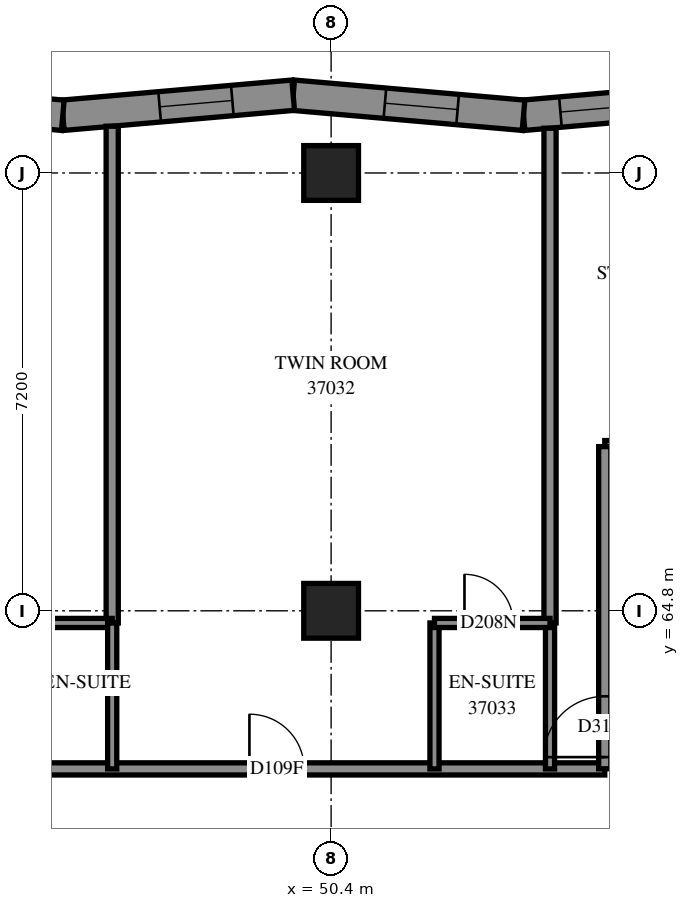
"""IFC4 building model, lengths in metres.
Left out: names, types, materials, properties, quantities, classifications, styles, units other than length and angle.
Written with IfcOpenShell. Run it as: python <this file> out.ifc"""

import sys

from ifc_helpers import new_model, si_unit, direction, frame, frame_2d, origin, origin_2d, place, context, subcontext, project, spatial, polyline, rectangle, outline, extrude, element, fill, save


model = new_model("IFC4")
c1 = context("Model", 3, precision=1e-05, world=origin(), true_north=direction((0.0, 1.0)))
c2 = subcontext(c1, "Body", "Model", "MODEL_VIEW")
j1 = project(units=[si_unit("LENGTHUNIT", "METRE"), si_unit("PLANEANGLEUNIT", "RADIAN")], contexts=[c1])
p1 = place(None, origin())
s1 = spatial("IfcSite", under=j1, at=p1, CompositionType="ELEMENT")
p2 = place(p1, origin())
s2 = spatial("IfcBuilding", under=s1, at=p2, CompositionType="ELEMENT")
p3 = place(p2, frame((0.0, 0.0, 138.8)))
s3 = spatial("IfcBuildingStorey", under=s2, at=p3, CompositionType="ELEMENT", Elevation=138.8)
for number, where, z_axis, x_axis in (
    (1, (50.4, 64.8, 0.0), (0.0, 0.0, 1.0), (1.0, 0.0, 0.0)),
    (2, (50.4, 72.0, 0.0), (0.0, 0.0, 1.0), (1.0, 0.0, 0.0)),
):
    element("IfcColumn", number, at=place(p3, frame(where, z_axis=z_axis, x_axis=x_axis)), inside=s3, PredefinedType="COLUMN", context=c2, shape_type="SweptSolid", body=[
        extrude(rectangle(XDim=0.9, YDim=0.9, at=origin_2d()), origin(), (0.0, 0.0, 1.0), 3.1),
    ])
p4 = place(p3, frame((57.353, 73.279, 0.0), z_axis=(0.0, 0.0, 1.0), x_axis=(-0.9962273538, -0.0867816769, 0.0)))
e3 = element("IfcWall", 3, at=p4, inside=s3, PredefinedType="SOLIDWALL", context=c2, shape_type="SweptSolid", body=[
    extrude(outline(polyline([(-0.022, -0.25), (3.781, -0.25), (3.824, 0.25), (0.022, 0.25), (-0.022, -0.25)])), origin(), (0.0, 0.0, 1.0), 3.1),
])
p5 = place(p4, frame((0.394, 0.0, 0.45)))
e4 = element("IfcOpeningElement", 4, at=p5, cuts=e3, PredefinedType="OPENING", context=c2, shape_type="SweptSolid", body=[
    extrude(rectangle(XDim=2.8, YDim=2.5, at=frame_2d((1.4, 1.25))), frame((0.0, 0.26, 0.0), z_axis=(0.0, -1.0, 0.0), x_axis=(1.0, 0.0, 0.0)), (0.0, 0.0, 1.0), 0.52),
])
p6 = place(p3, frame((53.564, 72.949, 0.0), z_axis=(0.0, 0.0, 1.0), x_axis=(-0.9962271558, 0.0867839505, 0.0)))
e5 = element("IfcWall", 5, at=p6, inside=s3, PredefinedType="SOLIDWALL", context=c2, shape_type="SweptSolid", body=[
    extrude(outline(polyline([(0.022, -0.25), (3.824, -0.25), (3.781, 0.25), (-0.022, 0.25), (0.022, -0.25)])), origin(), (0.0, 0.0, 1.0), 3.1),
])
p7 = place(p6, frame((1.088, 0.0, 0.45)))
e6 = element("IfcOpeningElement", 6, at=p7, cuts=e5, PredefinedType="OPENING", context=c2, shape_type="SweptSolid", body=[
    extrude(rectangle(XDim=1.2, YDim=2.5, at=frame_2d((0.6, 1.25))), frame((0.0, 0.26, 0.0), z_axis=(0.0, -1.0, 0.0), x_axis=(1.0, 0.0, 0.0)), (0.0, 0.0, 1.0), 0.52),
])
p8 = place(p3, frame((49.776, 73.279, 0.0), z_axis=(0.0, 0.0, 1.0), x_axis=(-0.9962273538, -0.0867816769, 0.0)))
e7 = element("IfcWall", 7, at=p8, inside=s3, PredefinedType="SOLIDWALL", context=c2, shape_type="SweptSolid", body=[
    extrude(outline(polyline([(-0.022, -0.25), (3.781, -0.25), (3.824, 0.25), (0.022, 0.25), (-0.022, -0.25)])), origin(), (0.0, 0.0, 1.0), 3.1),
])
p9 = place(p8, frame((1.005, 0.0, 0.45)))
e8 = element("IfcOpeningElement", 8, at=p9, cuts=e7, PredefinedType="OPENING", context=c2, shape_type="SweptSolid", body=[
    extrude(rectangle(XDim=1.2, YDim=2.5, at=frame_2d((0.6, 1.25))), frame((0.0, 0.26, 0.0), z_axis=(0.0, -1.0, 0.0), x_axis=(1.0, 0.0, 0.0)), (0.0, 0.0, 1.0), 0.52),
])
p10 = place(p3, frame((45.988, 72.949, 0.0), z_axis=(0.0, 0.0, 1.0), x_axis=(-0.9962273538, 0.0867816769, 0.0)))
e9 = element("IfcWall", 9, at=p10, inside=s3, PredefinedType="SOLIDWALL", context=c2, shape_type="SweptSolid", body=[
    extrude(outline(polyline([(0.022, -0.25), (3.824, -0.25), (3.781, 0.25), (-0.022, 0.25), (0.022, -0.25)])), origin(), (0.0, 0.0, 1.0), 3.1),
])
p11 = place(p10, frame((0.899, 0.0, 0.45)))
e10 = element("IfcOpeningElement", 10, at=p11, cuts=e9, PredefinedType="OPENING", context=c2, shape_type="SweptSolid", body=[
    extrude(rectangle(XDim=1.2, YDim=2.5, at=frame_2d((0.6, 1.25))), frame((0.0, 0.26, 0.0), z_axis=(0.0, -1.0, 0.0), x_axis=(1.0, 0.0, 0.0)), (0.0, 0.0, 1.0), 0.52),
])
p12 = place(p3, frame((54.9, 67.5, 0.0), z_axis=(0.0, 0.0, 1.0), x_axis=(1.0, 0.0, 0.0)))
e11 = element("IfcWall", 11, at=p12, inside=s3, PredefinedType="PARTITIONING", context=c2, shape_type="SweptSolid", body=[
    extrude(rectangle(XDim=19.8, YDim=0.2, at=frame_2d((9.9, 0.0))), origin(), (0.0, 0.0, 1.0), 3.1),
])
p13 = place(p12, frame((6.586, 0.0, 0.0)))
e12 = element("IfcOpeningElement", 12, at=p13, cuts=e11, PredefinedType="OPENING", context=c2, shape_type="SweptSolid", body=[
    extrude(rectangle(XDim=1.0, YDim=2.1, at=frame_2d((0.5, 1.05))), frame((0.0, 0.11, 0.0), z_axis=(0.0, -1.0, 0.0), x_axis=(1.0, 0.0, 0.0)), (0.0, 0.0, 1.0), 0.22),
])
p14 = place(p12, frame((14.089, 0.0, 0.0)))
e13 = element("IfcOpeningElement", 13, at=p14, cuts=e11, PredefinedType="OPENING", context=c2, shape_type="SweptSolid", body=[
    extrude(rectangle(XDim=1.0, YDim=2.1, at=frame_2d((0.5, 1.05))), frame((0.0, 0.11, 0.0), z_axis=(0.0, -1.0, 0.0), x_axis=(1.0, 0.0, 0.0)), (0.0, 0.0, 1.0), 0.22),
])
p15 = place(p3, frame((40.602, 62.2, 0.0), z_axis=(0.0, 0.0, 1.0), x_axis=(1.0, 0.0, 0.0)))
e14 = element("IfcWall", 14, at=p15, inside=s3, PredefinedType="PARTITIONING", context=c2, shape_type="SweptSolid", body=[
    extrude(rectangle(XDim=14.298, YDim=0.2, at=frame_2d((7.149, 0.0))), origin(), (0.0, 0.0, 1.0), 3.1),
])
p16 = place(p15, frame((1.306, 0.0, 0.0)))
e15 = element("IfcOpeningElement", 15, at=p16, cuts=e14, PredefinedType="OPENING", context=c2, shape_type="SweptSolid", body=[
    extrude(rectangle(XDim=0.9, YDim=2.1, at=frame_2d((0.45, 1.05))), frame((0.0, 0.11, 0.0), z_axis=(0.0, -1.0, 0.0), x_axis=(1.0, 0.0, 0.0)), (0.0, 0.0, 1.0), 0.22),
])
p17 = place(p15, frame((8.455, 0.0, 0.0)))
e16 = element("IfcOpeningElement", 16, at=p17, cuts=e14, PredefinedType="OPENING", context=c2, shape_type="SweptSolid", body=[
    extrude(rectangle(XDim=0.9, YDim=2.1, at=frame_2d((0.45, 1.05))), frame((0.0, 0.11, 0.0), z_axis=(0.0, -1.0, 0.0), x_axis=(1.0, 0.0, 0.0)), (0.0, 0.0, 1.0), 0.22),
])
p18 = place(p3, frame((46.8, 64.6, 0.0), z_axis=(0.0, 0.0, 1.0), x_axis=(0.0, 1.0, 0.0)))
e17 = element("IfcWall", 17, at=p18, inside=s3, PredefinedType="PARTITIONING", context=c2, shape_type="SweptSolid", body=[
    extrude(rectangle(XDim=8.169, YDim=0.2, at=frame_2d((4.085, 0.0))), origin(), (0.0, 0.0, 1.0), 3.1),
])
p19 = place(p3, frame((54.0, 64.6, 0.0), z_axis=(0.0, 0.0, 1.0), x_axis=(0.0, 1.0, 0.0)))
e18 = element("IfcWall", 18, at=p19, inside=s3, PredefinedType="PARTITIONING", context=c2, shape_type="SweptSolid", body=[
    extrude(rectangle(XDim=8.136, YDim=0.2, at=frame_2d((4.068, 0.0))), origin(), (0.0, 0.0, 1.0), 3.1),
])
p20 = place(p3, frame((54.9, 62.202, 0.0), z_axis=(0.0, 0.0, 1.0), x_axis=(0.0, 1.0, 0.0)))
e19 = element("IfcWall", 19, at=p20, inside=s3, PredefinedType="PARTITIONING", context=c2, shape_type="SweptSolid", body=[
    extrude(rectangle(XDim=5.298, YDim=0.2, at=frame_2d((2.649, 0.0))), origin(), (0.0, 0.0, 1.0), 3.1),
])
p21 = place(p20, frame((0.192, 0.0, 0.0)))
e20 = element("IfcOpeningElement", 20, at=p21, cuts=e19, PredefinedType="OPENING", context=c2, shape_type="SweptSolid", body=[
    extrude(rectangle(XDim=1.0, YDim=2.1, at=frame_2d((0.5, 1.05))), frame((0.0, 0.11, 0.0), z_axis=(0.0, -1.0, 0.0), x_axis=(1.0, 0.0, 0.0)), (0.0, 0.0, 1.0), 0.22),
])
p22 = place(p3, frame((44.0, 64.6, 0.0), z_axis=(0.0, 0.0, 1.0), x_axis=(1.0, 0.0, 0.0)))
e21 = element("IfcWall", 21, at=p22, inside=s3, PredefinedType="PARTITIONING", context=c2, shape_type="SweptSolid", body=[
    extrude(rectangle(XDim=2.8, YDim=0.15, at=frame_2d((1.4, 0.0))), origin(), (0.0, 0.0, 1.0), 3.1),
])
p23 = place(p22, frame((0.94, 0.0, 0.0)))
e22 = element("IfcOpeningElement", 22, at=p23, cuts=e21, PredefinedType="OPENING", context=c2, shape_type="SweptSolid", body=[
    extrude(rectangle(XDim=0.8, YDim=2.1, at=frame_2d((0.4, 1.05))), frame((0.0, 0.085, 0.0), z_axis=(0.0, -1.0, 0.0), x_axis=(1.0, 0.0, 0.0)), (0.0, 0.0, 1.0), 0.17),
])
for number, where, z_axis, x_axis in (
    (23, (46.8, 62.2, 0.0), (0.0, 0.0, 1.0), (0.0, 1.0, 0.0)),
    (24, (52.1, 62.2, 0.0), (0.0, 0.0, 1.0), (0.0, 1.0, 0.0)),
    (25, (54.0, 62.2, 0.0), (0.0, 0.0, 1.0), (0.0, 1.0, 0.0)),
):
    element("IfcWall", number, at=place(p3, frame(where, z_axis=z_axis, x_axis=x_axis)), inside=s3, PredefinedType="PARTITIONING", context=c2, shape_type="SweptSolid", body=[
        extrude(rectangle(XDim=2.4, YDim=0.15, at=frame_2d((1.2, 0.0))), origin(), (0.0, 0.0, 1.0), 3.1),
    ])
p24 = place(p3, frame((52.1, 64.6, 0.0), z_axis=(0.0, 0.0, 1.0), x_axis=(1.0, 0.0, 0.0)))
e26 = element("IfcWall", 26, at=p24, inside=s3, PredefinedType="PARTITIONING", context=c2, shape_type="SweptSolid", body=[
    extrude(rectangle(XDim=1.9, YDim=0.15, at=frame_2d((0.95, 0.0))), origin(), (0.0, 0.0, 1.0), 3.1),
])
p25 = place(p24, frame((0.493, 0.0, 0.0)))
e27 = element("IfcOpeningElement", 27, at=p25, cuts=e26, PredefinedType="OPENING", context=c2, shape_type="SweptSolid", body=[
    extrude(rectangle(XDim=0.8, YDim=2.1, at=frame_2d((0.4, 1.05))), frame((0.0, 0.085, 0.0), z_axis=(0.0, -1.0, 0.0), x_axis=(1.0, 0.0, 0.0)), (0.0, 0.0, 1.0), 0.17),
])
p26 = place(p5, origin())
e28 = element("IfcWindow", 28, at=p26, inside=s3, PartitioningType="SINGLE_PANEL", PredefinedType="WINDOW", context=c2, shape_type="SweptSolid", body=[
    extrude(rectangle(XDim=2.8, YDim=2.5, at=frame_2d((1.4, 1.25))), frame((0.0, 0.18, 0.0), z_axis=(0.0, -1.0, 0.0), x_axis=(1.0, 0.0, 0.0)), (0.0, 0.0, 1.0), 0.06),
])
fill(e4, e28)
p27 = place(p7, origin())
e29 = element("IfcWindow", 29, at=p27, inside=s3, PartitioningType="SINGLE_PANEL", PredefinedType="WINDOW", context=c2, shape_type="SweptSolid", body=[
    extrude(rectangle(XDim=1.2, YDim=2.5, at=frame_2d((0.6, 1.25))), frame((0.0, 0.18, 0.0), z_axis=(0.0, -1.0, 0.0), x_axis=(1.0, 0.0, 0.0)), (0.0, 0.0, 1.0), 0.06),
])
fill(e6, e29)
p28 = place(p9, origin())
e30 = element("IfcWindow", 30, at=p28, inside=s3, PartitioningType="SINGLE_PANEL", PredefinedType="WINDOW", context=c2, shape_type="SweptSolid", body=[
    extrude(rectangle(XDim=1.2, YDim=2.5, at=frame_2d((0.6, 1.25))), frame((0.0, 0.18, 0.0), z_axis=(0.0, -1.0, 0.0), x_axis=(1.0, 0.0, 0.0)), (0.0, 0.0, 1.0), 0.06),
])
fill(e8, e30)
p29 = place(p17, origin())
e31 = element("IfcDoor", 31, at=p29, inside=s3, OperationType="SINGLE_SWING_LEFT", PredefinedType="DOOR", context=c2, shape_type="SweptSolid", body=[
    extrude(rectangle(XDim=0.9, YDim=2.1, at=frame_2d((0.45, 1.05))), frame((0.0, 0.025, 0.0), z_axis=(0.0, -1.0, 0.0), x_axis=(1.0, 0.0, 0.0)), (0.0, 0.0, 1.0), 0.05),
])
fill(e16, e31)
p30 = place(p25, origin())
e32 = element("IfcDoor", 32, at=p30, inside=s3, OperationType="SINGLE_SWING_RIGHT", PredefinedType="DOOR", context=c2, shape_type="SweptSolid", body=[
    extrude(rectangle(XDim=0.8, YDim=2.1, at=frame_2d((0.4, 1.05))), frame((0.0, 0.025, 0.0), z_axis=(0.0, -1.0, 0.0), x_axis=(1.0, 0.0, 0.0)), (0.0, 0.0, 1.0), 0.05),
])
fill(e27, e32)
p31 = place(p21, origin())
e33 = element("IfcDoor", 33, at=p31, inside=s3, OperationType="SINGLE_SWING_LEFT", PredefinedType="DOOR", context=c2, shape_type="SweptSolid", body=[
    extrude(rectangle(XDim=1.0, YDim=2.1, at=frame_2d((0.5, 1.05))), frame((0.0, 0.025, 0.0), z_axis=(0.0, -1.0, 0.0), x_axis=(1.0, 0.0, 0.0)), (0.0, 0.0, 1.0), 0.05),
])
fill(e20, e33)
save(model, sys.argv[1])
